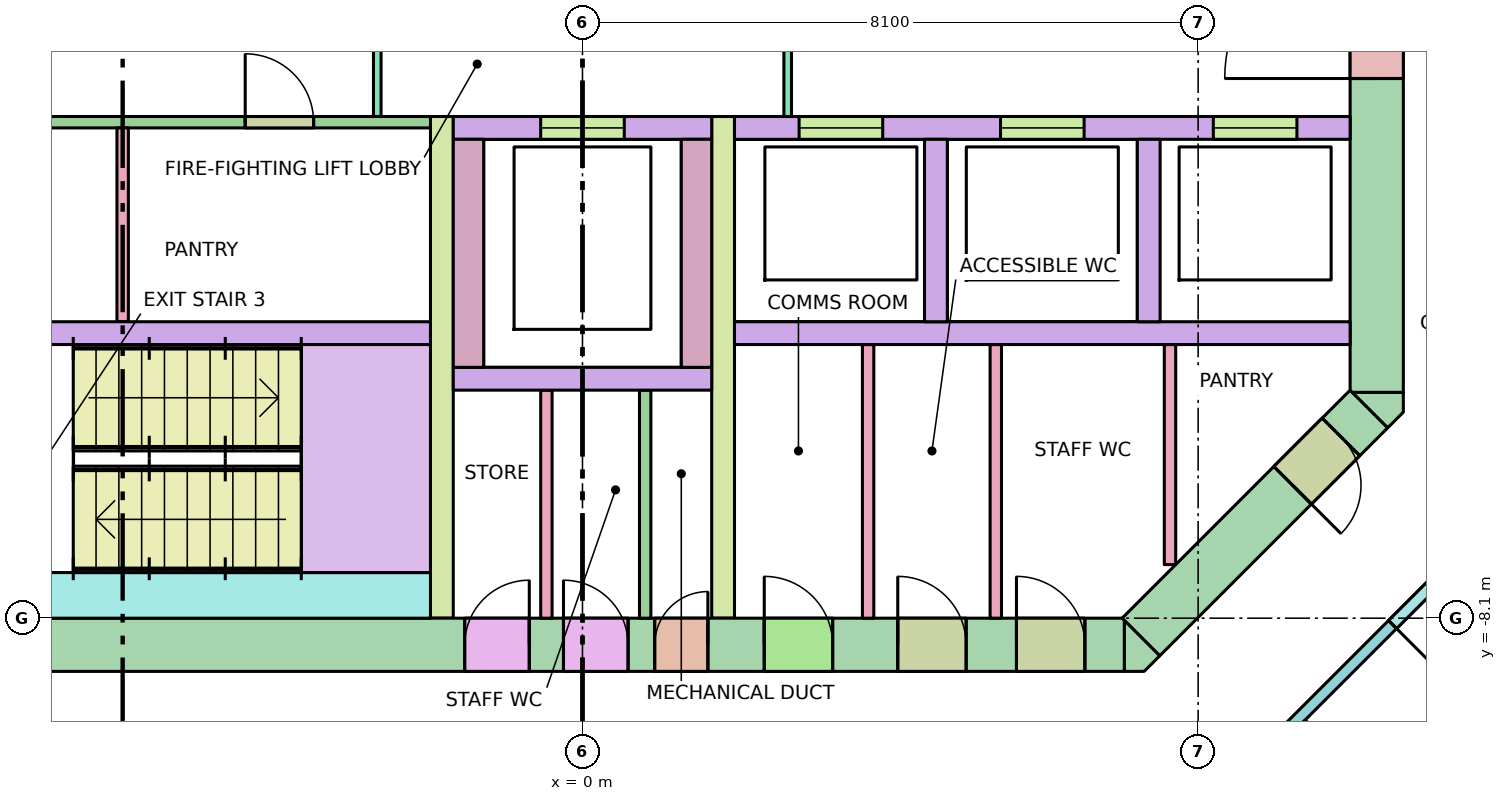
"""IFC4 building model, lengths in metres.
Left out: names, types, materials, properties, quantities, classifications, styles, units other than length and angle.
Written with IfcOpenShell. Run it as: python <this file> out.ifc"""

import sys

from ifc_helpers import new_model, si_unit, direction, frame, frame_2d, origin, place, context, subcontext, project, spatial, polyline, rectangle, outline, extrude, element, fill, save


model = new_model("IFC4")
c1 = context("Model", 3, precision=1e-05, world=origin(), true_north=direction((0.0, 1.0)))
c2 = subcontext(c1, "Body", "Model", "MODEL_VIEW")
j1 = project(units=[si_unit("LENGTHUNIT", "METRE"), si_unit("PLANEANGLEUNIT", "RADIAN")], contexts=[c1])
p1 = place(None, origin())
s1 = spatial("IfcSite", under=j1, at=p1, CompositionType="ELEMENT")
p2 = place(p1, origin())
s2 = spatial("IfcBuilding", under=s1, at=p2, CompositionType="ELEMENT")
p3 = place(p2, frame((0.0, 0.0, 165.3)))
s3 = spatial("IfcBuildingStorey", under=s2, at=p3, CompositionType="ELEMENT", Elevation=165.3)
p4 = place(p3, frame((-7.13, -8.45, -0.28), z_axis=(0.0, 0.0, 1.0), x_axis=(1.0, 0.0, 0.0)))
e1 = element("IfcWall", 1, at=p4, inside=s3, PredefinedType="SHEAR", context=c2, shape_type="SweptSolid", body=[
    extrude(rectangle(XDim=14.26, YDim=0.7, at=frame_2d((7.13, 0.0))), origin(), (0.0, 0.0, 1.0), 3.7),
])
p5 = place(p4, frame((8.08, 0.0, 0.28)))
e2 = element("IfcOpeningElement", 2, at=p5, cuts=e1, PredefinedType="OPENING", context=c2, shape_type="SweptSolid", body=[
    extrude(rectangle(XDim=0.7, YDim=2.1, at=frame_2d((0.35, 1.05))), frame((0.0, 0.36, 0.0), z_axis=(0.0, -1.0, 0.0), x_axis=(1.0, 0.0, 0.0)), (0.0, 0.0, 1.0), 0.72),
])
p6 = place(p4, frame((5.58, 0.0, 0.28)))
e3 = element("IfcOpeningElement", 3, at=p6, cuts=e1, PredefinedType="OPENING", context=c2, shape_type="SweptSolid", body=[
    extrude(rectangle(XDim=0.85, YDim=2.1, at=frame_2d((0.425, 1.05))), frame((0.0, 0.36, 0.0), z_axis=(0.0, -1.0, 0.0), x_axis=(1.0, 0.0, 0.0)), (0.0, 0.0, 1.0), 0.72),
])
p7 = place(p4, frame((6.88, 0.0, 0.28)))
e4 = element("IfcOpeningElement", 4, at=p7, cuts=e1, PredefinedType="OPENING", context=c2, shape_type="SweptSolid", body=[
    extrude(rectangle(XDim=0.85, YDim=2.1, at=frame_2d((0.425, 1.05))), frame((0.0, 0.36, 0.0), z_axis=(0.0, -1.0, 0.0), x_axis=(1.0, 0.0, 0.0)), (0.0, 0.0, 1.0), 0.72),
])
p8 = place(p4, frame((9.521, 0.0, 0.28)))
e5 = element("IfcOpeningElement", 5, at=p8, cuts=e1, PredefinedType="OPENING", context=c2, shape_type="SweptSolid", body=[
    extrude(rectangle(XDim=0.9, YDim=2.1, at=frame_2d((0.45, 1.05))), frame((0.0, 0.36, 0.0), z_axis=(0.0, -1.0, 0.0), x_axis=(1.0, 0.0, 0.0)), (0.0, 0.0, 1.0), 0.72),
])
p9 = place(p4, frame((11.278, 0.0, 0.28)))
e6 = element("IfcOpeningElement", 6, at=p9, cuts=e1, PredefinedType="OPENING", context=c2, shape_type="SweptSolid", body=[
    extrude(rectangle(XDim=0.9, YDim=2.1, at=frame_2d((0.45, 1.05))), frame((0.0, 0.36, 0.0), z_axis=(0.0, -1.0, 0.0), x_axis=(1.0, 0.0, 0.0)), (0.0, 0.0, 1.0), 0.72),
])
p10 = place(p4, frame((12.84, 0.0, 0.28)))
e7 = element("IfcOpeningElement", 7, at=p10, cuts=e1, PredefinedType="OPENING", context=c2, shape_type="SweptSolid", body=[
    extrude(rectangle(XDim=0.9, YDim=2.1, at=frame_2d((0.45, 1.05))), frame((0.0, 0.36, 0.0), z_axis=(0.0, -1.0, 0.0), x_axis=(1.0, 0.0, 0.0)), (0.0, 0.0, 1.0), 0.72),
])
p11 = place(p3, frame((10.45, -5.13, -0.28), z_axis=(0.0, 0.0, 1.0), x_axis=(0.0, 1.0, 0.0)))
e8 = element("IfcWall", 8, at=p11, inside=s3, PredefinedType="SHEAR", context=c2, shape_type="SweptSolid", body=[
    extrude(rectangle(XDim=10.26, YDim=0.7, at=frame_2d((5.13, 0.0))), origin(), (0.0, 0.0, 1.0), 3.7),
])
p12 = place(p11, frame((4.13, 0.0, 0.28)))
e9 = element("IfcOpeningElement", 9, at=p12, cuts=e8, PredefinedType="OPENING", context=c2, shape_type="SweptSolid", body=[
    extrude(rectangle(XDim=2.0, YDim=2.1, at=frame_2d((1.0, 1.05))), frame((0.0, 0.36, 0.0), z_axis=(0.0, -1.0, 0.0), x_axis=(1.0, 0.0, 0.0)), (0.0, 0.0, 1.0), 0.72),
])
p13 = place(p3, frame((10.347, -5.347, -0.28), z_axis=(0.0, 0.0, 1.0), x_axis=(-0.707106781187, -0.707106781187, 0.0)))
e10 = element("IfcWall", 10, at=p13, inside=s3, PredefinedType="SHEAR", context=c2, shape_type="SweptSolid", body=[
    extrude(rectangle(XDim=4.243, YDim=0.7, at=frame_2d((2.121, 0.0))), origin(), (0.0, 0.0, 1.0), 3.7),
])
p14 = place(p13, frame((0.52, 0.0, 0.28)))
e11 = element("IfcOpeningElement", 11, at=p14, cuts=e10, PredefinedType="OPENING", context=c2, shape_type="SweptSolid", body=[
    extrude(rectangle(XDim=0.9, YDim=2.1, at=frame_2d((0.45, 1.05))), frame((0.0, 0.36, 0.0), z_axis=(0.0, -1.0, 0.0), x_axis=(1.0, 0.0, 0.0)), (0.0, 0.0, 1.0), 0.72),
])
p15 = place(p3, frame((0.0, 0.0, -0.28)))
e12 = element("IfcWall", 12, at=p15, inside=s3, PredefinedType="SHEAR", context=c2, shape_type="SweptSolid", body=[
    extrude(outline(polyline([(7.39, -8.8), (7.13, -8.8), (7.13, -8.8), (7.13, -8.13), (7.595, -8.595), (7.595, -8.595), (7.595, -8.595), (7.39, -8.8)])), origin(), (0.0, 0.0, 1.0), 3.7),
])
p16 = place(p3, frame((0.0, 0.0, -0.28)))
e13 = element("IfcWall", 13, at=p16, inside=s3, PredefinedType="SHEAR", context=c2, shape_type="SweptSolid", body=[
    extrude(outline(polyline([(10.8, -5.39), (10.595, -5.595), (10.595, -5.595), (10.595, -5.595), (10.13, -5.13), (10.8, -5.13), (10.8, -5.13), (10.8, -5.39)])), origin(), (0.0, 0.0, 1.0), 3.7),
])
for number, where, z_axis, x_axis in (
    (14, (-10.1, -4.35, 0.0), (0.0, 0.0, 1.0), (1.0, 0.0, 0.0)),
    (15, (2.0, -4.35, 0.0), (0.0, 0.0, 1.0), (1.0, 0.0, 0.0)),
):
    element("IfcWall", number, at=place(p3, frame(where, z_axis=z_axis, x_axis=x_axis)), inside=s3, PredefinedType="SOLIDWALL", context=c2, shape_type="SweptSolid", body=[
        extrude(rectangle(XDim=8.1, YDim=0.3, at=frame_2d((4.05, 0.0))), origin(), (0.0, 0.0, 1.0), 3.42),
    ])
p17 = place(p3, frame((2.0, -1.65, 0.0), z_axis=(0.0, 0.0, 1.0), x_axis=(1.0, 0.0, 0.0)))
e16 = element("IfcWall", 16, at=p17, inside=s3, PredefinedType="SOLIDWALL", context=c2, shape_type="SweptSolid", body=[
    extrude(rectangle(XDim=8.1, YDim=0.3, at=frame_2d((4.05, 0.0))), origin(), (0.0, 0.0, 1.0), 3.42),
])
p18 = place(p17, frame((0.85, 0.0, 0.0)))
e17 = element("IfcOpeningElement", 17, at=p18, cuts=e16, PredefinedType="OPENING", context=c2, shape_type="SweptSolid", body=[
    extrude(rectangle(XDim=1.1, YDim=2.1, at=frame_2d((0.55, 1.05))), frame((0.0, 0.16, 0.0), z_axis=(0.0, -1.0, 0.0), x_axis=(1.0, 0.0, 0.0)), (0.0, 0.0, 1.0), 0.32),
])
p19 = place(p17, frame((3.5, 0.0, 0.0)))
e18 = element("IfcOpeningElement", 18, at=p19, cuts=e16, PredefinedType="OPENING", context=c2, shape_type="SweptSolid", body=[
    extrude(rectangle(XDim=1.1, YDim=2.1, at=frame_2d((0.55, 1.05))), frame((0.0, 0.16, 0.0), z_axis=(0.0, -1.0, 0.0), x_axis=(1.0, 0.0, 0.0)), (0.0, 0.0, 1.0), 0.32),
])
p20 = place(p17, frame((6.3, 0.0, 0.0)))
e19 = element("IfcOpeningElement", 19, at=p20, cuts=e16, PredefinedType="OPENING", context=c2, shape_type="SweptSolid", body=[
    extrude(rectangle(XDim=1.1, YDim=2.1, at=frame_2d((0.55, 1.05))), frame((0.0, 0.16, 0.0), z_axis=(0.0, -1.0, 0.0), x_axis=(1.0, 0.0, 0.0)), (0.0, 0.0, 1.0), 0.32),
])
for number, where, z_axis, x_axis in (
    (20, (4.65, -4.2, 0.0), (0.0, 0.0, 1.0), (0.0, 1.0, 0.0)),
    (21, (7.45, -4.2, 0.0), (0.0, 0.0, 1.0), (0.0, 1.0, 0.0)),
):
    element("IfcWall", number, at=place(p3, frame(where, z_axis=z_axis, x_axis=x_axis)), inside=s3, PredefinedType="SOLIDWALL", context=c2, shape_type="SweptSolid", body=[
        extrude(rectangle(XDim=2.4, YDim=0.3, at=frame_2d((1.2, 0.0))), origin(), (0.0, 0.0, 1.0), 3.42),
    ])
for number, where, z_axis, x_axis in (
    (22, (-1.85, -8.1, 0.0), (0.0, 0.0, 1.0), (0.0, 1.0, 0.0)),
    (23, (1.85, -8.1, 0.0), (0.0, 0.0, 1.0), (0.0, 1.0, 0.0)),
):
    element("IfcWall", number, at=place(p3, frame(where, z_axis=z_axis, x_axis=x_axis)), inside=s3, PredefinedType="SHEAR", context=c2, shape_type="SweptSolid", body=[
        extrude(rectangle(XDim=6.6, YDim=0.3, at=frame_2d((3.3, 0.0))), origin(), (0.0, 0.0, 1.0), 3.42),
    ])
p21 = place(p3, frame((-1.7, -1.65, 0.0), z_axis=(0.0, 0.0, 1.0), x_axis=(1.0, 0.0, 0.0)))
e24 = element("IfcWall", 24, at=p21, inside=s3, PredefinedType="SOLIDWALL", context=c2, shape_type="SweptSolid", body=[
    extrude(rectangle(XDim=3.4, YDim=0.3, at=frame_2d((1.7, 0.0))), origin(), (0.0, 0.0, 1.0), 3.42),
])
p22 = place(p21, frame((1.15, 0.0, 0.0)))
e25 = element("IfcOpeningElement", 25, at=p22, cuts=e24, PredefinedType="OPENING", context=c2, shape_type="SweptSolid", body=[
    extrude(rectangle(XDim=1.1, YDim=2.1, at=frame_2d((0.55, 1.05))), frame((0.0, 0.16, 0.0), z_axis=(0.0, -1.0, 0.0), x_axis=(1.0, 0.0, 0.0)), (0.0, 0.0, 1.0), 0.32),
])
for number, where, z_axis, x_axis in (
    (26, (-1.5, -4.8, 0.0), (0.0, 0.0, 1.0), (0.0, 1.0, 0.0)),
    (27, (1.5, -4.8, 0.0), (0.0, 0.0, 1.0), (0.0, 1.0, 0.0)),
):
    element("IfcWall", number, at=place(p3, frame(where, z_axis=z_axis, x_axis=x_axis)), inside=s3, PredefinedType="SOLIDWALL", context=c2, shape_type="SweptSolid", body=[
        extrude(rectangle(XDim=3.0, YDim=0.4, at=frame_2d((1.5, 0.0))), origin(), (0.0, 0.0, 1.0), 3.42),
    ])
p23 = place(p3, frame((-1.7, -4.95, 0.0), z_axis=(0.0, 0.0, 1.0), x_axis=(1.0, 0.0, 0.0)))
e28 = element("IfcWall", 28, at=p23, inside=s3, PredefinedType="SOLIDWALL", context=c2, shape_type="SweptSolid", body=[
    extrude(rectangle(XDim=3.4, YDim=0.3, at=frame_2d((1.7, 0.0))), origin(), (0.0, 0.0, 1.0), 3.42),
])
p24 = place(p3, frame((-7.5, -7.6, 0.0), z_axis=(0.0, 0.0, 1.0), x_axis=(1.0, 0.0, 0.0)))
e29 = element("IfcWall", 29, at=p24, inside=s3, PredefinedType="SHEAR", context=c2, shape_type="SweptSolid", body=[
    extrude(rectangle(XDim=0.6, YDim=0.2, at=frame_2d((0.3, 0.0))), origin(), (0.0, 0.0, 1.0), 3.42),
])
p25 = place(p3, frame((-7.37, -7.8, 0.0), z_axis=(0.0, 0.0, 1.0), x_axis=(1.0, 0.0, 0.0)))
e30 = element("IfcWall", 30, at=p25, inside=s3, PredefinedType="SHEAR", context=c2, shape_type="SweptSolid", body=[
    extrude(rectangle(XDim=5.37, YDim=0.6, at=frame_2d((2.685, 0.0))), origin(), (0.0, 0.0, 1.0), 3.42),
])
p26 = place(p3, frame((-2.7, -1.5, 0.0), z_axis=(0.0, 0.0, 1.0), x_axis=(0.0, 1.0, 0.0)))
e31 = element("IfcWall", 31, at=p26, inside=s3, PredefinedType="PARTITIONING", context=c2, shape_type="SweptSolid", body=[
    extrude(rectangle(XDim=3.0, YDim=0.1, at=frame_2d((1.5, 0.0))), origin(), (0.0, 0.0, 1.0), 3.42),
])
p27 = place(p26, frame((0.9, 0.0, 0.0)))
e32 = element("IfcOpeningElement", 32, at=p27, cuts=e31, PredefinedType="OPENING", context=c2, shape_type="SweptSolid", body=[
    extrude(rectangle(XDim=1.2, YDim=2.1, at=frame_2d((0.6, 1.05))), frame((0.0, 0.06, 0.0), z_axis=(0.0, -1.0, 0.0), x_axis=(1.0, 0.0, 0.0)), (0.0, 0.0, 1.0), 0.12),
])
p28 = place(p3, frame((2.7, -1.5, 0.0), z_axis=(0.0, 0.0, 1.0), x_axis=(0.0, 1.0, 0.0)))
e33 = element("IfcWall", 33, at=p28, inside=s3, PredefinedType="PARTITIONING", context=c2, shape_type="SweptSolid", body=[
    extrude(rectangle(XDim=3.0, YDim=0.1, at=frame_2d((1.5, 0.0))), origin(), (0.0, 0.0, 1.0), 3.42),
])
p29 = place(p28, frame((0.9, 0.0, 0.0)))
e34 = element("IfcOpeningElement", 34, at=p29, cuts=e33, PredefinedType="OPENING", context=c2, shape_type="SweptSolid", body=[
    extrude(rectangle(XDim=1.2, YDim=2.1, at=frame_2d((0.6, 1.05))), frame((0.0, 0.06, 0.0), z_axis=(0.0, -1.0, 0.0), x_axis=(1.0, 0.0, 0.0)), (0.0, 0.0, 1.0), 0.12),
])
for number, where, z_axis, x_axis in (
    (35, (0.825, -8.1, 0.0), (0.0, 0.0, 1.0), (0.0, 1.0, 0.0)),
    (36, (-0.475, -8.1, 0.0), (0.0, 0.0, 1.0), (0.0, 1.0, 0.0)),
):
    element("IfcWall", number, at=place(p3, frame(where, z_axis=z_axis, x_axis=x_axis)), inside=s3, PredefinedType="PARTITIONING", context=c2, shape_type="SweptSolid", body=[
        extrude(rectangle(XDim=3.0, YDim=0.15, at=frame_2d((1.5, 0.0))), origin(), (0.0, 0.0, 1.0), 3.42),
    ])
for number, where, z_axis, x_axis in (
    (37, (3.758, -8.1, 0.0), (0.0, 0.0, 1.0), (0.0, 1.0, 0.0)),
    (38, (5.438, -8.1, 0.0), (0.0, 0.0, 1.0), (0.0, 1.0, 0.0)),
):
    element("IfcWall", number, at=place(p3, frame(where, z_axis=z_axis, x_axis=x_axis)), inside=s3, PredefinedType="PARTITIONING", context=c2, shape_type="SweptSolid", body=[
        extrude(rectangle(XDim=3.6, YDim=0.15, at=frame_2d((1.8, 0.0))), origin(), (0.0, 0.0, 1.0), 3.42),
    ])
p30 = place(p3, frame((7.73, -7.395, 0.0), z_axis=(0.0, 0.0, 1.0), x_axis=(0.0, 1.0, 0.0)))
e39 = element("IfcWall", 39, at=p30, inside=s3, PredefinedType="PARTITIONING", context=c2, shape_type="SweptSolid", body=[
    extrude(rectangle(XDim=2.895, YDim=0.15, at=frame_2d((1.448, 0.0))), origin(), (0.0, 0.0, 1.0), 3.42),
])
p31 = place(p3, frame((-6.05, -4.2, 0.0), z_axis=(0.0, 0.0, 1.0), x_axis=(0.0, 1.0, 0.0)))
e40 = element("IfcWall", 40, at=p31, inside=s3, PredefinedType="PARTITIONING", context=c2, shape_type="SweptSolid", body=[
    extrude(rectangle(XDim=2.55, YDim=0.15, at=frame_2d((1.275, 0.0))), origin(), (0.0, 0.0, 1.0), 3.42),
])
p32 = place(p3, frame((-10.1, -1.575, 0.0), z_axis=(0.0, 0.0, 1.0), x_axis=(1.0, 0.0, 0.0)))
e41 = element("IfcWall", 41, at=p32, inside=s3, PredefinedType="PARTITIONING", context=c2, shape_type="SweptSolid", body=[
    extrude(rectangle(XDim=8.1, YDim=0.15, at=frame_2d((4.05, 0.0))), origin(), (0.0, 0.0, 1.0), 3.42),
])
p33 = place(p32, frame((1.538, 0.0, 0.0)))
e42 = element("IfcOpeningElement", 42, at=p33, cuts=e41, PredefinedType="OPENING", context=c2, shape_type="SweptSolid", body=[
    extrude(rectangle(XDim=0.9, YDim=2.1, at=frame_2d((0.45, 1.05))), frame((0.0, 0.085, 0.0), z_axis=(0.0, -1.0, 0.0), x_axis=(1.0, 0.0, 0.0)), (0.0, 0.0, 1.0), 0.17),
])
p34 = place(p32, frame((5.663, 0.0, 0.0)))
e43 = element("IfcOpeningElement", 43, at=p34, cuts=e41, PredefinedType="OPENING", context=c2, shape_type="SweptSolid", body=[
    extrude(rectangle(XDim=0.9, YDim=2.1, at=frame_2d((0.45, 1.05))), frame((0.0, 0.085, 0.0), z_axis=(0.0, -1.0, 0.0), x_axis=(1.0, 0.0, 0.0)), (0.0, 0.0, 1.0), 0.17),
])
p35 = place(p3, frame((12.638, -6.204, 0.0), z_axis=(0.0, 0.0, 1.0), x_axis=(-0.707106781187, -0.707106781187, 0.0)))
e44 = element("IfcWall", 44, at=p35, inside=s3, PredefinedType="PARTITIONING", context=c2, shape_type="SweptSolid", body=[
    extrude(rectangle(XDim=6.271, YDim=0.15, at=frame_2d((3.135, 0.0))), origin(), (0.0, 0.0, 1.0), 2.62),
])
p36 = place(p35, frame((1.8, 0.0, 0.0)))
e45 = element("IfcOpeningElement", 45, at=p36, cuts=e44, PredefinedType="OPENING", context=c2, shape_type="SweptSolid", body=[
    extrude(rectangle(XDim=1.0, YDim=2.1, at=frame_2d((0.5, 1.05))), frame((0.0, 0.085, 0.0), z_axis=(0.0, -1.0, 0.0), x_axis=(1.0, 0.0, 0.0)), (0.0, 0.0, 1.0), 0.17),
])
p37 = place(p3, frame((9.474, -9.474, 0.0), z_axis=(0.0, 0.0, 1.0), x_axis=(0.707106781187, -0.707106781187, 0.0)))
e46 = element("IfcWall", 46, at=p37, inside=s3, PredefinedType="PARTITIONING", context=c2, shape_type="SweptSolid", body=[
    extrude(rectangle(XDim=5.439, YDim=0.1, at=frame_2d((2.719, 0.0))), origin(), (0.0, 0.0, 1.0), 2.62),
])
p38 = place(p18, origin())
e47 = element("IfcDoor", 47, at=p38, inside=s3, OperationType="DOUBLE_DOOR_SLIDING", PredefinedType="DOOR", context=c2, shape_type="SweptSolid", body=[
    extrude(rectangle(XDim=1.1, YDim=2.1, at=frame_2d((0.55, 1.05))), frame((0.0, 0.025, 0.0), z_axis=(0.0, -1.0, 0.0), x_axis=(1.0, 0.0, 0.0)), (0.0, 0.0, 1.0), 0.05),
])
fill(e17, e47)
p39 = place(p19, origin())
e48 = element("IfcDoor", 48, at=p39, inside=s3, OperationType="DOUBLE_DOOR_SLIDING", PredefinedType="DOOR", context=c2, shape_type="SweptSolid", body=[
    extrude(rectangle(XDim=1.1, YDim=2.1, at=frame_2d((0.55, 1.05))), frame((0.0, 0.025, 0.0), z_axis=(0.0, -1.0, 0.0), x_axis=(1.0, 0.0, 0.0)), (0.0, 0.0, 1.0), 0.05),
])
fill(e18, e48)
p40 = place(p20, origin())
e49 = element("IfcDoor", 49, at=p40, inside=s3, OperationType="DOUBLE_DOOR_SLIDING", PredefinedType="DOOR", context=c2, shape_type="SweptSolid", body=[
    extrude(rectangle(XDim=1.1, YDim=2.1, at=frame_2d((0.55, 1.05))), frame((0.0, 0.025, 0.0), z_axis=(0.0, -1.0, 0.0), x_axis=(1.0, 0.0, 0.0)), (0.0, 0.0, 1.0), 0.05),
])
fill(e19, e49)
p41 = place(p22, origin())
e50 = element("IfcDoor", 50, at=p41, inside=s3, OperationType="DOUBLE_DOOR_SLIDING", PredefinedType="DOOR", context=c2, shape_type="SweptSolid", body=[
    extrude(rectangle(XDim=1.1, YDim=2.1, at=frame_2d((0.55, 1.05))), frame((0.0, 0.025, 0.0), z_axis=(0.0, -1.0, 0.0), x_axis=(1.0, 0.0, 0.0)), (0.0, 0.0, 1.0), 0.05),
])
fill(e25, e50)
p42 = place(p12, origin())
e51 = element("IfcDoor", 51, at=p42, inside=s3, OperationType="DOUBLE_DOOR_SINGLE_SWING", PredefinedType="DOOR", context=c2, shape_type="SweptSolid", body=[
    extrude(rectangle(XDim=2.0, YDim=2.1, at=frame_2d((1.0, 1.05))), frame((0.0, 0.025, 0.0), z_axis=(0.0, -1.0, 0.0), x_axis=(1.0, 0.0, 0.0)), (0.0, 0.0, 1.0), 0.05),
])
fill(e9, e51)
p43 = place(p5, origin())
e52 = element("IfcDoor", 52, at=p43, inside=s3, OperationType="SINGLE_SWING_RIGHT", PredefinedType="DOOR", context=c2, shape_type="SweptSolid", body=[
    extrude(rectangle(XDim=0.7, YDim=2.1, at=frame_2d((0.35, 1.05))), frame((0.0, 0.025, 0.0), z_axis=(0.0, -1.0, 0.0), x_axis=(1.0, 0.0, 0.0)), (0.0, 0.0, 1.0), 0.05),
])
fill(e2, e52)
p44 = place(p6, origin())
e53 = element("IfcDoor", 53, at=p44, inside=s3, OperationType="SINGLE_SWING_RIGHT", PredefinedType="DOOR", context=c2, shape_type="SweptSolid", body=[
    extrude(rectangle(XDim=0.85, YDim=2.1, at=frame_2d((0.425, 1.05))), frame((0.0, 0.025, 0.0), z_axis=(0.0, -1.0, 0.0), x_axis=(1.0, 0.0, 0.0)), (0.0, 0.0, 1.0), 0.05),
])
fill(e3, e53)
p45 = place(p7, origin())
e54 = element("IfcDoor", 54, at=p45, inside=s3, OperationType="SINGLE_SWING_LEFT", PredefinedType="DOOR", context=c2, shape_type="SweptSolid", body=[
    extrude(rectangle(XDim=0.85, YDim=2.1, at=frame_2d((0.425, 1.05))), frame((0.0, 0.025, 0.0), z_axis=(0.0, -1.0, 0.0), x_axis=(1.0, 0.0, 0.0)), (0.0, 0.0, 1.0), 0.05),
])
fill(e4, e54)
p46 = place(p8, origin())
e55 = element("IfcDoor", 55, at=p46, inside=s3, OperationType="SINGLE_SWING_LEFT", PredefinedType="DOOR", context=c2, shape_type="SweptSolid", body=[
    extrude(rectangle(XDim=0.9, YDim=2.1, at=frame_2d((0.45, 1.05))), frame((0.0, 0.025, 0.0), z_axis=(0.0, -1.0, 0.0), x_axis=(1.0, 0.0, 0.0)), (0.0, 0.0, 1.0), 0.05),
])
fill(e5, e55)
p47 = place(p9, origin())
e56 = element("IfcDoor", 56, at=p47, inside=s3, OperationType="SINGLE_SWING_LEFT", PredefinedType="DOOR", context=c2, shape_type="SweptSolid", body=[
    extrude(rectangle(XDim=0.9, YDim=2.1, at=frame_2d((0.45, 1.05))), frame((0.0, 0.025, 0.0), z_axis=(0.0, -1.0, 0.0), x_axis=(1.0, 0.0, 0.0)), (0.0, 0.0, 1.0), 0.05),
])
fill(e6, e56)
p48 = place(p10, origin())
e57 = element("IfcDoor", 57, at=p48, inside=s3, OperationType="SINGLE_SWING_LEFT", PredefinedType="DOOR", context=c2, shape_type="SweptSolid", body=[
    extrude(rectangle(XDim=0.9, YDim=2.1, at=frame_2d((0.45, 1.05))), frame((0.0, 0.025, 0.0), z_axis=(0.0, -1.0, 0.0), x_axis=(1.0, 0.0, 0.0)), (0.0, 0.0, 1.0), 0.05),
])
fill(e7, e57)
p49 = place(p14, origin())
e58 = element("IfcDoor", 58, at=p49, inside=s3, OperationType="SINGLE_SWING_RIGHT", PredefinedType="DOOR", context=c2, shape_type="SweptSolid", body=[
    extrude(rectangle(XDim=0.9, YDim=2.1, at=frame_2d((0.45, 1.05))), frame((0.0, 0.025, 0.0), z_axis=(0.0, -1.0, 0.0), x_axis=(1.0, 0.0, 0.0)), (0.0, 0.0, 1.0), 0.05),
])
fill(e11, e58)
p50 = place(p34, origin())
e59 = element("IfcDoor", 59, at=p50, inside=s3, OperationType="SINGLE_SWING_LEFT", PredefinedType="DOOR", context=c2, shape_type="SweptSolid", body=[
    extrude(rectangle(XDim=0.9, YDim=2.1, at=frame_2d((0.45, 1.05))), frame((0.0, 0.025, 0.0), z_axis=(0.0, -1.0, 0.0), x_axis=(1.0, 0.0, 0.0)), (0.0, 0.0, 1.0), 0.05),
])
fill(e43, e59)
p51 = place(p36, origin())
e60 = element("IfcDoor", 60, at=p51, inside=s3, OperationType="SINGLE_SWING_RIGHT", PredefinedType="DOOR", context=c2, shape_type="SweptSolid", body=[
    extrude(rectangle(XDim=1.0, YDim=2.1, at=frame_2d((0.5, 1.05))), frame((0.0, 0.025, 0.0), z_axis=(0.0, -1.0, 0.0), x_axis=(1.0, 0.0, 0.0)), (0.0, 0.0, 1.0), 0.05),
])
fill(e45, e60)
save(model, sys.argv[1])
